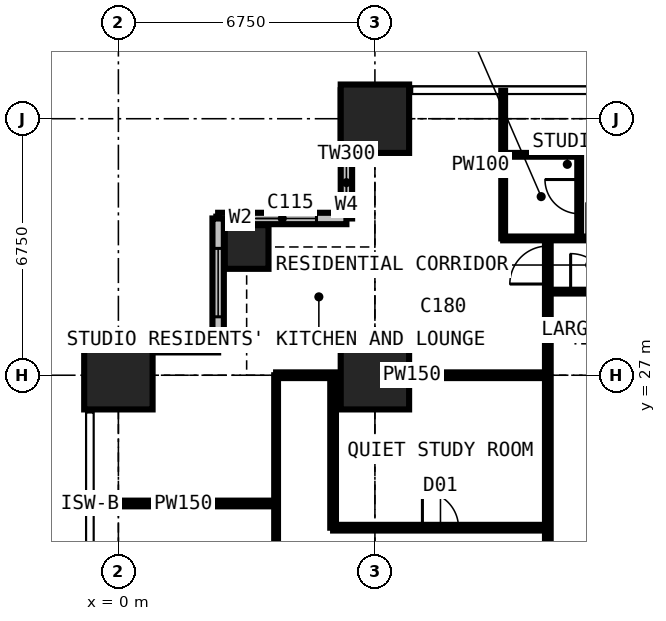
"""IFC4 building model, lengths in metres.
Left out: names, types, materials, properties, quantities, classifications, styles, units other than length and angle.
Written with IfcOpenShell. Run it as: python <this file> out.ifc"""

import sys

from ifc_helpers import new_model, si_unit, direction, frame, frame_2d, origin, origin_2d, place, context, subcontext, project, spatial, rectangle, extrude, element, fill, save


model = new_model("IFC4")
c1 = context("Model", 3, precision=1e-05, world=origin(), true_north=direction((0.0, 1.0)))
c2 = subcontext(c1, "Body", "Model", "MODEL_VIEW")
j1 = project(units=[si_unit("LENGTHUNIT", "METRE"), si_unit("PLANEANGLEUNIT", "RADIAN")], contexts=[c1])
p1 = place(None, origin())
s1 = spatial("IfcSite", under=j1, at=p1, CompositionType="ELEMENT")
p2 = place(p1, origin())
s2 = spatial("IfcBuilding", under=s1, at=p2, CompositionType="ELEMENT")
p3 = place(p2, frame((0.0, 0.0, 90.9)))
s3 = spatial("IfcBuildingStorey", under=s2, at=p3, CompositionType="ELEMENT", Elevation=90.9)
p4 = place(p3, frame((0.0, 27.0, 0.0), z_axis=(0.0, 0.0, 1.0), x_axis=(1.0, 0.0, 0.0)))
e1 = element("IfcColumn", 1, at=p4, inside=s3, PredefinedType="COLUMN", context=c2, shape_type="SweptSolid", body=[
    extrude(rectangle(XDim=1.8, YDim=1.8, at=origin_2d()), origin(), (0.0, 0.0, 1.0), 3.6),
])
p5 = place(p3, frame((3.375, 30.375, 0.0), z_axis=(0.0, 0.0, 1.0), x_axis=(1.0, 0.0, 0.0)))
e2 = element("IfcColumn", 2, at=p5, inside=s3, PredefinedType="COLUMN", context=c2, shape_type="SweptSolid", body=[
    extrude(rectangle(XDim=1.15, YDim=1.15, at=origin_2d()), origin(), (0.0, 0.0, 1.0), 3.6),
])
for number, where, z_axis, x_axis in (
    (3, (6.75, 27.0, 0.0), (0.0, 0.0, 1.0), (1.0, 0.0, 0.0)),
    (4, (6.75, 33.75, 0.0), (0.0, 0.0, 1.0), (1.0, 0.0, 0.0)),
):
    element("IfcColumn", number, at=place(p3, frame(where, z_axis=z_axis, x_axis=x_axis)), inside=s3, PredefinedType="COLUMN", context=c2, shape_type="SweptSolid", body=[
        extrude(rectangle(XDim=1.8, YDim=1.8, at=origin_2d()), origin(), (0.0, 0.0, 1.0), 3.6),
    ])
p6 = place(p3, frame((6.0, 34.5, 0.0), z_axis=(0.0, 0.0, 1.0), x_axis=(0.0, -1.0, 0.0)))
e5 = element("IfcWall", 5, at=p6, inside=s3, PredefinedType="SOLIDWALL", context=c2, shape_type="SweptSolid", body=[
    extrude(rectangle(XDim=3.375, YDim=0.3, at=frame_2d((1.688, 0.0))), origin(), (0.0, 0.0, 1.0), 3.375),
])
p7 = place(p6, frame((1.833, 0.0, 0.9)))
e6 = element("IfcOpeningElement", 6, at=p7, cuts=e5, PredefinedType="OPENING", context=c2, shape_type="SweptSolid", body=[
    extrude(rectangle(XDim=1.2, YDim=1.8, at=frame_2d((0.6, 0.9))), frame((0.0, 0.16, 0.0), z_axis=(0.0, -1.0, 0.0), x_axis=(1.0, 0.0, 0.0)), (0.0, 0.0, 1.0), 0.32),
])
p8 = place(p3, frame((6.0, 31.125, 0.0), z_axis=(0.0, 0.0, 1.0), x_axis=(-1.0, 0.0, 0.0)))
e7 = element("IfcWall", 7, at=p8, inside=s3, PredefinedType="SOLIDWALL", context=c2, shape_type="SweptSolid", body=[
    extrude(rectangle(XDim=3.375, YDim=0.3, at=frame_2d((1.688, 0.0))), origin(), (0.0, 0.0, 1.0), 3.375),
])
p9 = place(p8, frame((0.788, 0.0, 0.6)))
e8 = element("IfcOpeningElement", 8, at=p9, cuts=e7, PredefinedType="OPENING", context=c2, shape_type="SweptSolid", body=[
    extrude(rectangle(XDim=1.8, YDim=2.1, at=frame_2d((0.9, 1.05))), frame((0.0, 0.16, 0.0), z_axis=(0.0, -1.0, 0.0), x_axis=(1.0, 0.0, 0.0)), (0.0, 0.0, 1.0), 0.32),
])
p10 = place(p3, frame((2.625, 31.125, 0.0), z_axis=(0.0, 0.0, 1.0), x_axis=(0.0, -1.0, 0.0)))
e9 = element("IfcWall", 9, at=p10, inside=s3, PredefinedType="SOLIDWALL", context=c2, shape_type="SweptSolid", body=[
    extrude(rectangle(XDim=3.375, YDim=0.3, at=frame_2d((1.688, 0.0))), origin(), (0.0, 0.0, 1.0), 3.375),
])
p11 = place(p10, frame((0.788, 0.0, 0.6)))
e10 = element("IfcOpeningElement", 10, at=p11, cuts=e9, PredefinedType="OPENING", context=c2, shape_type="SweptSolid", body=[
    extrude(rectangle(XDim=1.8, YDim=2.1, at=frame_2d((0.9, 1.05))), frame((0.0, 0.16, 0.0), z_axis=(0.0, -1.0, 0.0), x_axis=(1.0, 0.0, 0.0)), (0.0, 0.0, 1.0), 0.32),
])
p12 = place(p3, frame((2.625, 27.75, 0.0), z_axis=(0.0, 0.0, 1.0), x_axis=(-1.0, 0.0, 0.0)))
e11 = element("IfcWall", 11, at=p12, inside=s3, PredefinedType="SOLIDWALL", context=c2, shape_type="SweptSolid", body=[
    extrude(rectangle(XDim=3.375, YDim=0.3, at=frame_2d((1.688, 0.0))), origin(), (0.0, 0.0, 1.0), 3.375),
])
p13 = place(p12, frame((0.343, 0.0, 0.9)))
e12 = element("IfcOpeningElement", 12, at=p13, cuts=e11, PredefinedType="OPENING", context=c2, shape_type="SweptSolid", body=[
    extrude(rectangle(XDim=1.2, YDim=1.8, at=frame_2d((0.6, 0.9))), frame((0.0, 0.16, 0.0), z_axis=(0.0, -1.0, 0.0), x_axis=(1.0, 0.0, 0.0)), (0.0, 0.0, 1.0), 0.32),
])
p14 = place(p3, frame((-0.734, 23.625, 0.0), z_axis=(0.0, 0.0, 1.0), x_axis=(1.0, 0.0, 0.0)))
e13 = element("IfcWall", 13, at=p14, inside=s3, PredefinedType="PARTITIONING", context=c2, shape_type="SweptSolid", body=[
    extrude(rectangle(XDim=4.884, YDim=0.15, at=frame_2d((2.442, 0.0))), origin(), (0.0, 0.0, 1.0), 3.375),
])
p15 = place(p3, frame((4.15, 10.125, 0.0), z_axis=(0.0, 0.0, 1.0), x_axis=(0.0, 1.0, 0.0)))
e14 = element("IfcWall", 14, at=p15, inside=s3, PredefinedType="PARTITIONING", context=c2, shape_type="SweptSolid", body=[
    extrude(rectangle(XDim=16.875, YDim=0.1, at=frame_2d((8.438, 0.0))), origin(), (0.0, 0.0, 1.0), 3.375),
])
p16 = place(p15, frame((4.2, 0.0, 0.0)))
e15 = element("IfcOpeningElement", 15, at=p16, cuts=e14, PredefinedType="OPENING", context=c2, shape_type="SweptSolid", body=[
    extrude(rectangle(XDim=0.95, YDim=2.2, at=frame_2d((0.475, 1.1))), frame((0.0, 0.06, 0.0), z_axis=(0.0, -1.0, 0.0), x_axis=(1.0, 0.0, 0.0)), (0.0, 0.0, 1.0), 0.12),
])
p17 = place(p15, frame((10.95, 0.0, 0.0)))
e16 = element("IfcOpeningElement", 16, at=p17, cuts=e14, PredefinedType="OPENING", context=c2, shape_type="SweptSolid", body=[
    extrude(rectangle(XDim=0.95, YDim=2.2, at=frame_2d((0.475, 1.1))), frame((0.0, 0.06, 0.0), z_axis=(0.0, -1.0, 0.0), x_axis=(1.0, 0.0, 0.0)), (0.0, 0.0, 1.0), 0.12),
])
p18 = place(p3, frame((4.15, 27.0, 0.0), z_axis=(0.0, 0.0, 1.0), x_axis=(1.0, 0.0, 0.0)))
e17 = element("IfcWall", 17, at=p18, inside=s3, PredefinedType="PARTITIONING", context=c2, shape_type="SweptSolid", body=[
    extrude(rectangle(XDim=7.15, YDim=0.15, at=frame_2d((3.575, 0.0))), origin(), (0.0, 0.0, 1.0), 2.806),
])
p19 = place(p3, frame((5.65, 22.988, 0.0), z_axis=(0.0, 0.0, 1.0), x_axis=(0.0, 1.0, 0.0)))
e18 = element("IfcWall", 18, at=p19, inside=s3, PredefinedType="PARTITIONING", context=c2, shape_type="SweptSolid", body=[
    extrude(rectangle(XDim=4.012, YDim=0.15, at=frame_2d((2.006, 0.0))), origin(), (0.0, 0.0, 1.0), 3.375),
])
p20 = place(p3, frame((5.65, 22.988, 0.0), z_axis=(0.0, 0.0, 1.0), x_axis=(1.0, 0.0, 0.0)))
e19 = element("IfcWall", 19, at=p20, inside=s3, PredefinedType="PARTITIONING", context=c2, shape_type="SweptSolid", body=[
    extrude(rectangle(XDim=5.65, YDim=0.15, at=frame_2d((2.825, 0.0))), origin(), (0.0, 0.0, 1.0), 3.375),
])
p21 = place(p20, frame((2.35, 0.0, 0.0)))
e20 = element("IfcOpeningElement", 20, at=p21, cuts=e19, PredefinedType="OPENING", context=c2, shape_type="SweptSolid", body=[
    extrude(rectangle(XDim=0.95, YDim=2.2, at=frame_2d((0.475, 1.1))), frame((0.0, 0.085, 0.0), z_axis=(0.0, -1.0, 0.0), x_axis=(1.0, 0.0, 0.0)), (0.0, 0.0, 1.0), 0.17),
])
p22 = place(p3, frame((10.125, 30.6, 0.0), z_axis=(0.0, 0.0, 1.0), x_axis=(0.0, 1.0, 0.0)))
e21 = element("IfcWall", 21, at=p22, inside=s3, PredefinedType="PARTITIONING", context=c2, shape_type="SweptSolid", body=[
    extrude(rectangle(XDim=3.884, YDim=0.1, at=frame_2d((1.942, 0.0))), origin(), (0.0, 0.0, 1.0), 3.375),
])
p23 = place(p3, frame((10.125, 30.6, 0.0), z_axis=(0.0, 0.0, 1.0), x_axis=(1.0, 0.0, 0.0)))
e22 = element("IfcWall", 22, at=p23, inside=s3, PredefinedType="PARTITIONING", context=c2, shape_type="SweptSolid", body=[
    extrude(rectangle(XDim=3.375, YDim=0.1, at=frame_2d((1.688, 0.0))), origin(), (0.0, 0.0, 1.0), 3.375),
])
p24 = place(p23, frame((2.2, 0.0, 0.0)))
e23 = element("IfcOpeningElement", 23, at=p24, cuts=e22, PredefinedType="OPENING", context=c2, shape_type="SweptSolid", body=[
    extrude(rectangle(XDim=0.95, YDim=2.2, at=frame_2d((0.475, 1.1))), frame((0.0, 0.06, 0.0), z_axis=(0.0, -1.0, 0.0), x_axis=(1.0, 0.0, 0.0)), (0.0, 0.0, 1.0), 0.12),
])
p25 = place(p3, frame((10.125, 32.8, 0.0), z_axis=(0.0, 0.0, 1.0), x_axis=(1.0, 0.0, 0.0)))
e24 = element("IfcWall", 24, at=p25, inside=s3, PredefinedType="PARTITIONING", context=c2, shape_type="SweptSolid", body=[
    extrude(rectangle(XDim=2.0, YDim=0.1, at=frame_2d((1.0, 0.0))), origin(), (0.0, 0.0, 1.0), 3.375),
])
p26 = place(p3, frame((11.3, 11.3, 0.0), z_axis=(0.0, 0.0, 1.0), x_axis=(0.0, 1.0, 0.0)))
e25 = element("IfcWall", 25, at=p26, inside=s3, PredefinedType="PARTITIONING", context=c2, shape_type="SweptSolid", body=[
    extrude(rectangle(XDim=19.3, YDim=0.15, at=frame_2d((9.65, 0.0))), origin(), (0.0, 0.0, 1.0), 3.375),
])
p27 = place(p26, frame((18.1, 0.0, 0.0)))
e26 = element("IfcOpeningElement", 26, at=p27, cuts=e25, PredefinedType="OPENING", context=c2, shape_type="SweptSolid", body=[
    extrude(rectangle(XDim=1.0, YDim=2.2, at=frame_2d((0.5, 1.1))), frame((0.0, 0.085, 0.0), z_axis=(0.0, -1.0, 0.0), x_axis=(1.0, 0.0, 0.0)), (0.0, 0.0, 1.0), 0.17),
])
p28 = place(p26, frame((10.137, 0.0, 0.0)))
e27 = element("IfcOpeningElement", 27, at=p28, cuts=e25, PredefinedType="OPENING", context=c2, shape_type="SweptSolid", body=[
    extrude(rectangle(XDim=1.0, YDim=2.2, at=frame_2d((0.5, 1.1))), frame((0.0, 0.085, 0.0), z_axis=(0.0, -1.0, 0.0), x_axis=(1.0, 0.0, 0.0)), (0.0, 0.0, 1.0), 0.17),
])
p29 = place(p3, frame((11.3, 29.2, 0.0), z_axis=(0.0, 0.0, 1.0), x_axis=(1.0, 0.0, 0.0)))
e28 = element("IfcWall", 28, at=p29, inside=s3, PredefinedType="PARTITIONING", context=c2, shape_type="SweptSolid", body=[
    extrude(rectangle(XDim=19.075, YDim=0.1, at=frame_2d((9.538, 0.0))), origin(), (0.0, 0.0, 1.0), 3.375),
])
p30 = place(p29, frame((6.4, 0.0, 0.0)))
e29 = element("IfcOpeningElement", 29, at=p30, cuts=e28, PredefinedType="OPENING", context=c2, shape_type="SweptSolid", body=[
    extrude(rectangle(XDim=0.95, YDim=2.2, at=frame_2d((0.475, 1.1))), frame((0.0, 0.06, 0.0), z_axis=(0.0, -1.0, 0.0), x_axis=(1.0, 0.0, 0.0)), (0.0, 0.0, 1.0), 0.12),
])
p31 = place(p29, frame((13.15, 0.0, 0.0)))
e30 = element("IfcOpeningElement", 30, at=p31, cuts=e28, PredefinedType="OPENING", context=c2, shape_type="SweptSolid", body=[
    extrude(rectangle(XDim=0.95, YDim=2.2, at=frame_2d((0.475, 1.1))), frame((0.0, 0.06, 0.0), z_axis=(0.0, -1.0, 0.0), x_axis=(1.0, 0.0, 0.0)), (0.0, 0.0, 1.0), 0.12),
])
p32 = place(p29, frame((0.6, 0.0, 0.0)))
e31 = element("IfcOpeningElement", 31, at=p32, cuts=e28, PredefinedType="OPENING", context=c2, shape_type="SweptSolid", body=[
    extrude(rectangle(XDim=1.0, YDim=2.2, at=frame_2d((0.5, 1.1))), frame((0.0, 0.06, 0.0), z_axis=(0.0, -1.0, 0.0), x_axis=(1.0, 0.0, 0.0)), (0.0, 0.0, 1.0), 0.12),
])
p33 = place(p3, frame((12.125, 30.6, 0.0), z_axis=(0.0, 0.0, 1.0), x_axis=(0.0, 1.0, 0.0)))
e32 = element("IfcWall", 32, at=p33, inside=s3, PredefinedType="PARTITIONING", context=c2, shape_type="SweptSolid", body=[
    extrude(rectangle(XDim=2.2, YDim=0.1, at=frame_2d((1.1, 0.0))), origin(), (0.0, 0.0, 1.0), 3.375),
])
p34 = place(p33, frame((0.65, 0.0, 0.0)))
e33 = element("IfcOpeningElement", 33, at=p34, cuts=e32, PredefinedType="OPENING", context=c2, shape_type="SweptSolid", body=[
    extrude(rectangle(XDim=0.9, YDim=2.2, at=frame_2d((0.45, 1.1))), frame((0.0, 0.06, 0.0), z_axis=(0.0, -1.0, 0.0), x_axis=(1.0, 0.0, 0.0)), (0.0, 0.0, 1.0), 0.12),
])
p35 = place(p7, origin())
e34 = element("IfcWindow", 34, at=p35, inside=s3, PartitioningType="SINGLE_PANEL", PredefinedType="WINDOW", context=c2, shape_type="SweptSolid", body=[
    extrude(rectangle(XDim=1.2, YDim=1.8, at=frame_2d((0.6, 0.9))), frame((0.0, 0.03, 0.0), z_axis=(0.0, -1.0, 0.0), x_axis=(1.0, 0.0, 0.0)), (0.0, 0.0, 1.0), 0.06),
])
fill(e6, e34)
p36 = place(p9, origin())
e35 = element("IfcWindow", 35, at=p36, inside=s3, PartitioningType="SINGLE_PANEL", PredefinedType="WINDOW", context=c2, shape_type="SweptSolid", body=[
    extrude(rectangle(XDim=1.8, YDim=2.1, at=frame_2d((0.9, 1.05))), frame((0.0, 0.03, 0.0), z_axis=(0.0, -1.0, 0.0), x_axis=(1.0, 0.0, 0.0)), (0.0, 0.0, 1.0), 0.06),
])
fill(e8, e35)
p37 = place(p11, origin())
e36 = element("IfcWindow", 36, at=p37, inside=s3, PartitioningType="SINGLE_PANEL", PredefinedType="WINDOW", context=c2, shape_type="SweptSolid", body=[
    extrude(rectangle(XDim=1.8, YDim=2.1, at=frame_2d((0.9, 1.05))), frame((0.0, 0.03, 0.0), z_axis=(0.0, -1.0, 0.0), x_axis=(1.0, 0.0, 0.0)), (0.0, 0.0, 1.0), 0.06),
])
fill(e10, e36)
p38 = place(p13, origin())
e37 = element("IfcWindow", 37, at=p38, inside=s3, PartitioningType="SINGLE_PANEL", PredefinedType="WINDOW", context=c2, shape_type="SweptSolid", body=[
    extrude(rectangle(XDim=1.2, YDim=1.8, at=frame_2d((0.6, 0.9))), frame((0.0, 0.03, 0.0), z_axis=(0.0, -1.0, 0.0), x_axis=(1.0, 0.0, 0.0)), (0.0, 0.0, 1.0), 0.06),
])
fill(e12, e37)
p39 = place(p34, origin())
e38 = element("IfcDoor", 38, at=p39, inside=s3, OperationType="SINGLE_SWING_RIGHT", PredefinedType="DOOR", context=c2, shape_type="SweptSolid", body=[
    extrude(rectangle(XDim=0.9, YDim=2.2, at=frame_2d((0.45, 1.1))), frame((0.0, 0.025, 0.0), z_axis=(0.0, -1.0, 0.0), x_axis=(1.0, 0.0, 0.0)), (0.0, 0.0, 1.0), 0.05),
])
fill(e33, e38)
p40 = place(p32, origin())
e39 = element("IfcDoor", 39, at=p40, inside=s3, OperationType="SINGLE_SWING_LEFT", PredefinedType="DOOR", context=c2, shape_type="SweptSolid", body=[
    extrude(rectangle(XDim=1.0, YDim=2.2, at=frame_2d((0.5, 1.1))), frame((0.0, 0.025, 0.0), z_axis=(0.0, -1.0, 0.0), x_axis=(1.0, 0.0, 0.0)), (0.0, 0.0, 1.0), 0.05),
])
fill(e31, e39)
p41 = place(p27, origin())
e40 = element("IfcDoor", 40, at=p41, inside=s3, OperationType="SINGLE_SWING_LEFT", PredefinedType="DOOR", context=c2, shape_type="SweptSolid", body=[
    extrude(rectangle(XDim=1.0, YDim=2.2, at=frame_2d((0.5, 1.1))), frame((0.0, 0.025, 0.0), z_axis=(0.0, -1.0, 0.0), x_axis=(1.0, 0.0, 0.0)), (0.0, 0.0, 1.0), 0.05),
])
fill(e26, e40)
p42 = place(p21, origin())
e41 = element("IfcDoor", 41, at=p42, inside=s3, OperationType="SINGLE_SWING_LEFT", PredefinedType="DOOR", context=c2, shape_type="SweptSolid", body=[
    extrude(rectangle(XDim=0.95, YDim=2.2, at=frame_2d((0.475, 1.1))), frame((0.0, 0.025, 0.0), z_axis=(0.0, -1.0, 0.0), x_axis=(1.0, 0.0, 0.0)), (0.0, 0.0, 1.0), 0.05),
])
fill(e20, e41)
save(model, sys.argv[1])
